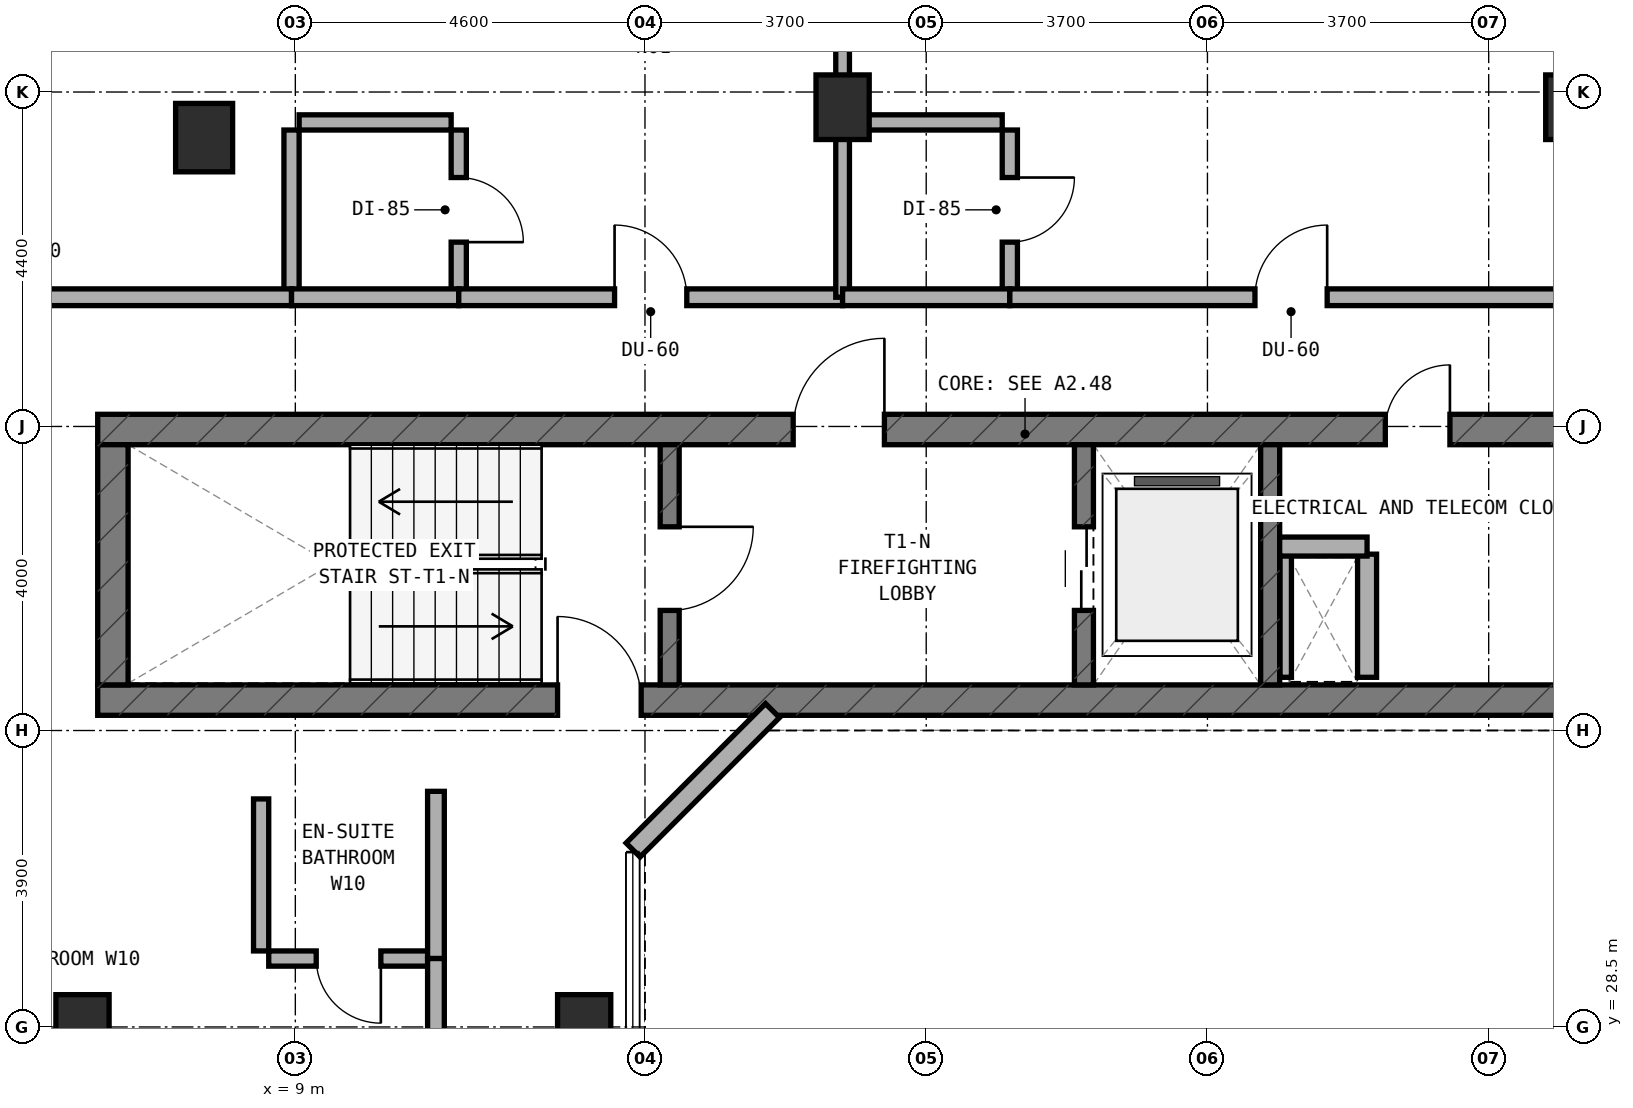
"""IFC4 building model, lengths in metres.
Left out: names, types, materials, properties, quantities, classifications, styles, units other than length and angle.
Written with IfcOpenShell. Run it as: python <this file> out.ifc"""

import sys

from ifc_helpers import new_model, si_unit, direction, frame, frame_2d, origin, origin_2d, place, context, subcontext, project, spatial, rectangle, extrude, element, fill, save


model = new_model("IFC4")
c1 = context("Model", 3, precision=1e-05, world=origin(), true_north=direction((0.0, 1.0)))
c2 = subcontext(c1, "Body", "Model", "MODEL_VIEW")
j1 = project(units=[si_unit("LENGTHUNIT", "METRE"), si_unit("PLANEANGLEUNIT", "RADIAN")], contexts=[c1])
p1 = place(None, origin())
s1 = spatial("IfcSite", under=j1, at=p1, CompositionType="ELEMENT")
p2 = place(p1, origin())
s2 = spatial("IfcBuilding", under=s1, at=p2, CompositionType="ELEMENT")
p3 = place(p2, frame((0.0, 0.0, 224.3)))
s3 = spatial("IfcBuildingStorey", under=s2, at=p3, CompositionType="ELEMENT", Elevation=224.3)
p4 = place(p3, frame((6.4, 32.8, 0.0), z_axis=(0.0, 0.0, 1.0), x_axis=(1.0, 0.0, 0.0)))
e1 = element("IfcWall", 1, at=p4, inside=s3, PredefinedType="SHEAR", context=c2, shape_type="SweptSolid", body=[
    extrude(rectangle(XDim=24.4, YDim=0.4, at=frame_2d((12.2, 0.0))), origin(), (0.0, 0.0, 1.0), 3.6),
])
p5 = place(p4, frame((6.05, 0.0, 0.0)))
e2 = element("IfcOpeningElement", 2, at=p5, cuts=e1, PredefinedType="OPENING", context=c2, shape_type="SweptSolid", body=[
    extrude(rectangle(XDim=1.1, YDim=2.15, at=frame_2d((0.55, 1.075))), frame((0.0, 0.21, 0.0), z_axis=(0.0, -1.0, 0.0), x_axis=(1.0, 0.0, 0.0)), (0.0, 0.0, 1.0), 0.42),
])
p6 = place(p3, frame((6.4, 36.36, 0.0), z_axis=(0.0, 0.0, 1.0), x_axis=(1.0, 0.0, 0.0)))
e3 = element("IfcWall", 3, at=p6, inside=s3, PredefinedType="SHEAR", context=c2, shape_type="SweptSolid", body=[
    extrude(rectangle(XDim=24.4, YDim=0.4, at=frame_2d((12.2, 0.0))), origin(), (0.0, 0.0, 1.0), 3.6),
])
p7 = place(p6, frame((9.15, 0.0, 0.0)))
e4 = element("IfcOpeningElement", 4, at=p7, cuts=e3, PredefinedType="OPENING", context=c2, shape_type="SweptSolid", body=[
    extrude(rectangle(XDim=1.2, YDim=2.15, at=frame_2d((0.6, 1.075))), frame((0.0, 0.21, 0.0), z_axis=(0.0, -1.0, 0.0), x_axis=(1.0, 0.0, 0.0)), (0.0, 0.0, 1.0), 0.42),
])
p8 = place(p6, frame((19.2, 0.0, 0.0)))
e5 = element("IfcOpeningElement", 5, at=p8, cuts=e3, PredefinedType="OPENING", context=c2, shape_type="SweptSolid", body=[
    extrude(rectangle(XDim=0.85, YDim=2.1, at=frame_2d((0.425, 1.05))), frame((0.0, 0.21, 0.0), z_axis=(0.0, -1.0, 0.0), x_axis=(1.0, 0.0, 0.0)), (0.0, 0.0, 1.0), 0.42),
])
p9 = place(p6, frame((16.94, 0.0, 0.0)))
e6 = element("IfcOpeningElement", 6, at=p9, cuts=e3, PredefinedType="OPENING", context=c2, shape_type="SweptSolid", body=[
    extrude(rectangle(XDim=0.85, YDim=2.1, at=frame_2d((0.425, 1.05))), frame((0.0, 0.21, 0.0), z_axis=(0.0, -1.0, 0.0), x_axis=(1.0, 0.0, 0.0)), (0.0, 0.0, 1.0), 0.42),
])
p10 = place(p3, frame((6.6, 33.0, 0.0), z_axis=(0.0, 0.0, 1.0), x_axis=(0.0, 1.0, 0.0)))
e7 = element("IfcWall", 7, at=p10, inside=s3, PredefinedType="SHEAR", context=c2, shape_type="SweptSolid", body=[
    extrude(rectangle(XDim=3.16, YDim=0.4, at=frame_2d((1.58, 0.0))), origin(), (0.0, 0.0, 1.0), 3.6),
])
p11 = place(p3, frame((13.925, 33.0, 0.0), z_axis=(0.0, 0.0, 1.0), x_axis=(0.0, 1.0, 0.0)))
e8 = element("IfcWall", 8, at=p11, inside=s3, PredefinedType="STANDARD", context=c2, shape_type="SweptSolid", body=[
    extrude(rectangle(XDim=3.16, YDim=0.25, at=frame_2d((1.58, 0.0))), origin(), (0.0, 0.0, 1.0), 3.32),
])
p12 = place(p11, frame((0.98, 0.0, 0.0)))
e9 = element("IfcOpeningElement", 9, at=p12, cuts=e8, PredefinedType="OPENING", context=c2, shape_type="SweptSolid", body=[
    extrude(rectangle(XDim=1.1, YDim=2.15, at=frame_2d((0.55, 1.075))), frame((0.0, 0.135, 0.0), z_axis=(0.0, -1.0, 0.0), x_axis=(1.0, 0.0, 0.0)), (0.0, 0.0, 1.0), 0.27),
])
p13 = place(p3, frame((19.375, 33.0, 0.0), z_axis=(0.0, 0.0, 1.0), x_axis=(0.0, 1.0, 0.0)))
e10 = element("IfcWall", 10, at=p13, inside=s3, PredefinedType="STANDARD", context=c2, shape_type="SweptSolid", body=[
    extrude(rectangle(XDim=3.16, YDim=0.25, at=frame_2d((1.58, 0.0))), origin(), (0.0, 0.0, 1.0), 3.32),
])
p14 = place(p13, frame((0.98, 0.0, 0.0)))
e11 = element("IfcOpeningElement", 11, at=p14, cuts=e10, PredefinedType="OPENING", context=c2, shape_type="SweptSolid", body=[
    extrude(rectangle(XDim=1.1, YDim=2.15, at=frame_2d((0.55, 1.075))), frame((0.0, 0.135, 0.0), z_axis=(0.0, -1.0, 0.0), x_axis=(1.0, 0.0, 0.0)), (0.0, 0.0, 1.0), 0.27),
])
p15 = place(p3, frame((21.825, 33.0, 0.0), z_axis=(0.0, 0.0, 1.0), x_axis=(0.0, 1.0, 0.0)))
e12 = element("IfcWall", 12, at=p15, inside=s3, PredefinedType="STANDARD", context=c2, shape_type="SweptSolid", body=[
    extrude(rectangle(XDim=3.16, YDim=0.25, at=frame_2d((1.58, 0.0))), origin(), (0.0, 0.0, 1.0), 3.32),
])
for number, where, z_axis, x_axis in (
    (13, (16.2, 40.6, 0.0), (0.0, 0.0, 1.0), (1.0, 0.0, 0.0)),
    (14, (25.8, 40.6, 0.0), (0.0, 0.0, 1.0), (1.0, 0.0, 0.0)),
    (15, (6.2, 28.5, 0.0), (0.0, 0.0, 1.0), (1.0, 0.0, 0.0)),
):
    element("IfcColumn", number, at=place(p3, frame(where, z_axis=z_axis, x_axis=x_axis)), inside=s3, PredefinedType="COLUMN", context=c2, shape_type="SweptSolid", body=[
        extrude(rectangle(XDim=0.7, YDim=0.85, at=origin_2d()), origin(), (0.0, 0.0, 1.0), 3.6),
    ])
p16 = place(p3, frame((7.8, 40.2, 0.0), z_axis=(0.0, 0.0, 1.0), x_axis=(1.0, 0.0, 0.0)))
e16 = element("IfcColumn", 16, at=p16, inside=s3, PredefinedType="COLUMN", context=c2, shape_type="SweptSolid", body=[
    extrude(rectangle(XDim=0.75, YDim=0.9, at=origin_2d()), origin(), (0.0, 0.0, 1.0), 3.6),
])
p17 = place(p3, frame((12.8, 28.5, 0.0), z_axis=(0.0, 0.0, 1.0), x_axis=(1.0, 0.0, 0.0)))
e17 = element("IfcColumn", 17, at=p17, inside=s3, PredefinedType="COLUMN", context=c2, shape_type="SweptSolid", body=[
    extrude(rectangle(XDim=0.7, YDim=0.85, at=origin_2d()), origin(), (0.0, 0.0, 1.0), 3.6),
])
p18 = place(p3, frame((15.278, 32.662, 0.0), z_axis=(0.0, 0.0, 1.0), x_axis=(-0.707059717605, -0.707153841636, 0.0)))
e18 = element("IfcWall", 18, at=p18, inside=s3, PredefinedType="STANDARD", context=c2, shape_type="SweptSolid", body=[
    extrude(rectangle(XDim=2.594, YDim=0.26, at=frame_2d((1.297, 0.0))), origin(), (0.0, 0.0, 1.0), 3.32),
])
p19 = place(p3, frame((22.03, 33.1, 0.0), z_axis=(0.0, 0.0, 1.0), x_axis=(0.0, 1.0, 0.0)))
e19 = element("IfcWall", 19, at=p19, inside=s3, PredefinedType="PARTITIONING", context=c2, shape_type="SweptSolid", body=[
    extrude(rectangle(XDim=1.62, YDim=0.15, at=frame_2d((0.81, 0.0))), origin(), (0.0, 0.0, 1.0), 3.32),
])
p20 = place(p3, frame((23.1, 33.1, 0.0), z_axis=(0.0, 0.0, 1.0), x_axis=(0.0, 1.0, 0.0)))
e20 = element("IfcWall", 20, at=p20, inside=s3, PredefinedType="SOLIDWALL", context=c2, shape_type="SweptSolid", body=[
    extrude(rectangle(XDim=1.62, YDim=0.25, at=frame_2d((0.81, 0.0))), origin(), (0.0, 0.0, 1.0), 3.32),
])
p21 = place(p3, frame((21.95, 34.82, 0.0), z_axis=(0.0, 0.0, 1.0), x_axis=(1.0, 0.0, 0.0)))
e21 = element("IfcWall", 21, at=p21, inside=s3, PredefinedType="SOLIDWALL", context=c2, shape_type="SweptSolid", body=[
    extrude(rectangle(XDim=1.15, YDim=0.25, at=frame_2d((0.575, 0.0))), origin(), (0.0, 0.0, 1.0), 3.32),
])
p22 = place(p3, frame((11.15, 38.2, 0.0), z_axis=(0.0, 0.0, 1.0), x_axis=(0.0, 1.0, 0.0)))
e22 = element("IfcWall", 22, at=p22, inside=s3, PredefinedType="PLUMBINGWALL", context=c2, shape_type="SweptSolid", body=[
    extrude(rectangle(XDim=2.1, YDim=0.2, at=frame_2d((1.05, 0.0))), origin(), (0.0, 0.0, 1.0), 3.015),
])
p23 = place(p22, frame((0.625, 0.0, 0.0)))
e23 = element("IfcOpeningElement", 23, at=p23, cuts=e22, PredefinedType="OPENING", context=c2, shape_type="SweptSolid", body=[
    extrude(rectangle(XDim=0.85, YDim=2.1, at=frame_2d((0.425, 1.05))), frame((0.0, 0.11, 0.0), z_axis=(0.0, -1.0, 0.0), x_axis=(1.0, 0.0, 0.0)), (0.0, 0.0, 1.0), 0.22),
])
p24 = place(p3, frame((9.05, 40.4, 0.0), z_axis=(0.0, 0.0, 1.0), x_axis=(1.0, 0.0, 0.0)))
e24 = element("IfcWall", 24, at=p24, inside=s3, PredefinedType="PLUMBINGWALL", context=c2, shape_type="SweptSolid", body=[
    extrude(rectangle(XDim=2.0, YDim=0.2, at=frame_2d((1.0, 0.0))), origin(), (0.0, 0.0, 1.0), 3.015),
])
p25 = place(p3, frame((8.95, 38.2, 0.0), z_axis=(0.0, 0.0, 1.0), x_axis=(0.0, 1.0, 0.0)))
e25 = element("IfcWall", 25, at=p25, inside=s3, PredefinedType="PLUMBINGWALL", context=c2, shape_type="SweptSolid", body=[
    extrude(rectangle(XDim=2.1, YDim=0.2, at=frame_2d((1.05, 0.0))), origin(), (0.0, 0.0, 1.0), 3.015),
])
p26 = place(p3, frame((1.96, 38.1, 0.0), z_axis=(0.0, 0.0, 1.0), x_axis=(1.0, 0.0, 0.0)))
e26 = element("IfcWall", 26, at=p26, inside=s3, PredefinedType="SOLIDWALL", context=c2, shape_type="SweptSolid", body=[
    extrude(rectangle(XDim=6.99, YDim=0.22, at=frame_2d((3.495, 0.0))), origin(), (0.0, 0.0, 1.0), 2.695),
])
p27 = place(p3, frame((8.95, 38.1, 0.0), z_axis=(0.0, 0.0, 1.0), x_axis=(1.0, 0.0, 0.0)))
e27 = element("IfcWall", 27, at=p27, inside=s3, PredefinedType="SOLIDWALL", context=c2, shape_type="SweptSolid", body=[
    extrude(rectangle(XDim=2.2, YDim=0.22, at=frame_2d((1.1, 0.0))), origin(), (0.0, 0.0, 1.0), 3.32),
])
p28 = place(p3, frame((11.15, 38.1, 0.0), z_axis=(0.0, 0.0, 1.0), x_axis=(1.0, 0.0, 0.0)))
e28 = element("IfcWall", 28, at=p28, inside=s3, PredefinedType="SOLIDWALL", context=c2, shape_type="SweptSolid", body=[
    extrude(rectangle(XDim=5.05, YDim=0.22, at=frame_2d((2.525, 0.0))), origin(), (0.0, 0.0, 1.0), 2.695),
])
p29 = place(p28, frame((2.05, 0.0, 0.0)))
e29 = element("IfcOpeningElement", 29, at=p29, cuts=e28, PredefinedType="OPENING", context=c2, shape_type="SweptSolid", body=[
    extrude(rectangle(XDim=0.95, YDim=2.1, at=frame_2d((0.475, 1.05))), frame((0.0, 0.12, 0.0), z_axis=(0.0, -1.0, 0.0), x_axis=(1.0, 0.0, 0.0)), (0.0, 0.0, 1.0), 0.24),
])
p30 = place(p3, frame((16.2, 38.1, 0.0), z_axis=(0.0, 0.0, 1.0), x_axis=(0.0, 1.0, 0.0)))
e30 = element("IfcWall", 30, at=p30, inside=s3, PredefinedType="SOLIDWALL", context=c2, shape_type="SweptSolid", body=[
    extrude(rectangle(XDim=6.04, YDim=0.18, at=frame_2d((3.02, 0.0))), origin(), (0.0, 0.0, 1.0), 2.695),
])
p31 = place(p3, frame((18.4, 38.2, 0.0), z_axis=(0.0, 0.0, 1.0), x_axis=(0.0, 1.0, 0.0)))
e31 = element("IfcWall", 31, at=p31, inside=s3, PredefinedType="PLUMBINGWALL", context=c2, shape_type="SweptSolid", body=[
    extrude(rectangle(XDim=2.1, YDim=0.2, at=frame_2d((1.05, 0.0))), origin(), (0.0, 0.0, 1.0), 3.055),
])
p32 = place(p31, frame((0.625, 0.0, 0.0)))
e32 = element("IfcOpeningElement", 32, at=p32, cuts=e31, PredefinedType="OPENING", context=c2, shape_type="SweptSolid", body=[
    extrude(rectangle(XDim=0.85, YDim=2.1, at=frame_2d((0.425, 1.05))), frame((0.0, 0.11, 0.0), z_axis=(0.0, -1.0, 0.0), x_axis=(1.0, 0.0, 0.0)), (0.0, 0.0, 1.0), 0.22),
])
p33 = place(p3, frame((16.3, 40.4, 0.0), z_axis=(0.0, 0.0, 1.0), x_axis=(1.0, 0.0, 0.0)))
e33 = element("IfcWall", 33, at=p33, inside=s3, PredefinedType="PLUMBINGWALL", context=c2, shape_type="SweptSolid", body=[
    extrude(rectangle(XDim=2.0, YDim=0.2, at=frame_2d((1.0, 0.0))), origin(), (0.0, 0.0, 1.0), 3.015),
])
p34 = place(p3, frame((16.2, 38.1, 0.0), z_axis=(0.0, 0.0, 1.0), x_axis=(1.0, 0.0, 0.0)))
e34 = element("IfcWall", 34, at=p34, inside=s3, PredefinedType="SOLIDWALL", context=c2, shape_type="SweptSolid", body=[
    extrude(rectangle(XDim=2.2, YDim=0.22, at=frame_2d((1.1, 0.0))), origin(), (0.0, 0.0, 1.0), 2.695),
])
p35 = place(p3, frame((18.4, 38.1, 0.0), z_axis=(0.0, 0.0, 1.0), x_axis=(1.0, 0.0, 0.0)))
e35 = element("IfcWall", 35, at=p35, inside=s3, PredefinedType="SOLIDWALL", context=c2, shape_type="SweptSolid", body=[
    extrude(rectangle(XDim=7.4, YDim=0.22, at=frame_2d((3.7, 0.0))), origin(), (0.0, 0.0, 1.0), 2.695),
])
p36 = place(p35, frame((3.225, 0.0, 0.0)))
e36 = element("IfcOpeningElement", 36, at=p36, cuts=e35, PredefinedType="OPENING", context=c2, shape_type="SweptSolid", body=[
    extrude(rectangle(XDim=0.95, YDim=2.1, at=frame_2d((0.475, 1.05))), frame((0.0, 0.12, 0.0), z_axis=(0.0, -1.0, 0.0), x_axis=(1.0, 0.0, 0.0)), (0.0, 0.0, 1.0), 0.24),
])
p37 = place(p3, frame((8.65, 29.4, 0.0), z_axis=(0.0, 0.0, 1.0), x_axis=(1.0, 0.0, 0.0)))
e37 = element("IfcWall", 37, at=p37, inside=s3, PredefinedType="PLUMBINGWALL", context=c2, shape_type="SweptSolid", body=[
    extrude(rectangle(XDim=2.1, YDim=0.2, at=frame_2d((1.05, 0.0))), origin(), (0.0, 0.0, 1.0), 3.32),
])
p38 = place(p37, frame((0.625, 0.0, 0.0)))
e38 = element("IfcOpeningElement", 38, at=p38, cuts=e37, PredefinedType="OPENING", context=c2, shape_type="SweptSolid", body=[
    extrude(rectangle(XDim=0.85, YDim=2.1, at=frame_2d((0.425, 1.05))), frame((0.0, 0.11, 0.0), z_axis=(0.0, -1.0, 0.0), x_axis=(1.0, 0.0, 0.0)), (0.0, 0.0, 1.0), 0.22),
])
p39 = place(p3, frame((8.55, 29.5, 0.0), z_axis=(0.0, 0.0, 1.0), x_axis=(0.0, 1.0, 0.0)))
e39 = element("IfcWall", 39, at=p39, inside=s3, PredefinedType="PLUMBINGWALL", context=c2, shape_type="SweptSolid", body=[
    extrude(rectangle(XDim=2.0, YDim=0.2, at=frame_2d((1.0, 0.0))), origin(), (0.0, 0.0, 1.0), 3.32),
])
p40 = place(p3, frame((10.85, 29.4, 0.0), z_axis=(0.0, 0.0, 1.0), x_axis=(0.0, 1.0, 0.0)))
e40 = element("IfcWall", 40, at=p40, inside=s3, PredefinedType="SOLIDWALL", context=c2, shape_type="SweptSolid", body=[
    extrude(rectangle(XDim=2.2, YDim=0.22, at=frame_2d((1.1, 0.0))), origin(), (0.0, 0.0, 1.0), 3.32),
])
p41 = place(p3, frame((10.85, 25.77, 0.0), z_axis=(0.0, 0.0, 1.0), x_axis=(0.0, 1.0, 0.0)))
e41 = element("IfcWall", 41, at=p41, inside=s3, PredefinedType="SOLIDWALL", context=c2, shape_type="SweptSolid", body=[
    extrude(rectangle(XDim=3.63, YDim=0.22, at=frame_2d((1.815, 0.0))), origin(), (0.0, 0.0, 1.0), 2.695),
])
p42 = place(p41, frame((1.34, 0.0, 0.0)))
e42 = element("IfcOpeningElement", 42, at=p42, cuts=e41, PredefinedType="OPENING", context=c2, shape_type="SweptSolid", body=[
    extrude(rectangle(XDim=0.95, YDim=2.1, at=frame_2d((0.475, 1.05))), frame((0.0, 0.12, 0.0), z_axis=(0.0, -1.0, 0.0), x_axis=(1.0, 0.0, 0.0)), (0.0, 0.0, 1.0), 0.24),
])
p43 = place(p12, frame((1.1, 0.0, 0.0), z_axis=(0.0, 0.0, 1.0), x_axis=(-1.0, 0.0, 0.0)))
e43 = element("IfcDoor", 43, at=p43, inside=s3, OperationType="SINGLE_SWING_LEFT", PredefinedType="DOOR", context=c2, shape_type="SweptSolid", body=[
    extrude(rectangle(XDim=1.1, YDim=2.15, at=frame_2d((0.55, 1.075))), frame((0.0, 0.025, 0.0), z_axis=(0.0, -1.0, 0.0), x_axis=(1.0, 0.0, 0.0)), (0.0, 0.0, 1.0), 0.05),
])
fill(e9, e43)
p44 = place(p7, origin())
e44 = element("IfcDoor", 44, at=p44, inside=s3, OperationType="SINGLE_SWING_RIGHT", PredefinedType="DOOR", context=c2, shape_type="SweptSolid", body=[
    extrude(rectangle(XDim=1.2, YDim=2.15, at=frame_2d((0.6, 1.075))), frame((0.0, 0.025, 0.0), z_axis=(0.0, -1.0, 0.0), x_axis=(1.0, 0.0, 0.0)), (0.0, 0.0, 1.0), 0.05),
])
fill(e4, e44)
p45 = place(p14, origin())
e45 = element("IfcDoor", 45, at=p45, inside=s3, OperationType="DOUBLE_DOOR_SLIDING", PredefinedType="DOOR", context=c2, shape_type="SweptSolid", body=[
    extrude(rectangle(XDim=1.1, YDim=2.15, at=frame_2d((0.55, 1.075))), frame((0.0, 0.025, 0.0), z_axis=(0.0, -1.0, 0.0), x_axis=(1.0, 0.0, 0.0)), (0.0, 0.0, 1.0), 0.05),
])
fill(e11, e45)
p46 = place(p9, origin())
e46 = element("IfcDoor", 46, at=p46, inside=s3, OperationType="SINGLE_SWING_RIGHT", PredefinedType="DOOR", context=c2, shape_type="SweptSolid", body=[
    extrude(rectangle(XDim=0.85, YDim=2.1, at=frame_2d((0.425, 1.05))), frame((0.0, 0.025, 0.0), z_axis=(0.0, -1.0, 0.0), x_axis=(1.0, 0.0, 0.0)), (0.0, 0.0, 1.0), 0.05),
])
fill(e6, e46)
p47 = place(p5, origin())
e47 = element("IfcDoor", 47, at=p47, inside=s3, OperationType="SINGLE_SWING_LEFT", PredefinedType="DOOR", context=c2, shape_type="SweptSolid", body=[
    extrude(rectangle(XDim=1.1, YDim=2.15, at=frame_2d((0.55, 1.075))), frame((0.0, 0.025, 0.0), z_axis=(0.0, -1.0, 0.0), x_axis=(1.0, 0.0, 0.0)), (0.0, 0.0, 1.0), 0.05),
])
fill(e2, e47)
p48 = place(p23, frame((0.85, 0.0, 0.0), z_axis=(0.0, 0.0, 1.0), x_axis=(-1.0, 0.0, 0.0)))
e48 = element("IfcDoor", 48, at=p48, inside=s3, OperationType="SINGLE_SWING_RIGHT", PredefinedType="DOOR", context=c2, shape_type="SweptSolid", body=[
    extrude(rectangle(XDim=0.85, YDim=2.1, at=frame_2d((0.425, 1.05))), frame((0.0, 0.025, 0.0), z_axis=(0.0, -1.0, 0.0), x_axis=(1.0, 0.0, 0.0)), (0.0, 0.0, 1.0), 0.05),
])
fill(e23, e48)
p49 = place(p29, origin())
e49 = element("IfcDoor", 49, at=p49, inside=s3, OperationType="SINGLE_SWING_LEFT", PredefinedType="DOOR", context=c2, shape_type="SweptSolid", body=[
    extrude(rectangle(XDim=0.95, YDim=2.1, at=frame_2d((0.475, 1.05))), frame((0.0, 0.025, 0.0), z_axis=(0.0, -1.0, 0.0), x_axis=(1.0, 0.0, 0.0)), (0.0, 0.0, 1.0), 0.05),
])
fill(e29, e49)
p50 = place(p32, frame((0.85, 0.0, 0.0), z_axis=(0.0, 0.0, 1.0), x_axis=(-1.0, 0.0, 0.0)))
e50 = element("IfcDoor", 50, at=p50, inside=s3, OperationType="SINGLE_SWING_LEFT", PredefinedType="DOOR", context=c2, shape_type="SweptSolid", body=[
    extrude(rectangle(XDim=0.85, YDim=2.1, at=frame_2d((0.425, 1.05))), frame((0.0, 0.025, 0.0), z_axis=(0.0, -1.0, 0.0), x_axis=(1.0, 0.0, 0.0)), (0.0, 0.0, 1.0), 0.05),
])
fill(e32, e50)
p51 = place(p36, origin())
e51 = element("IfcDoor", 51, at=p51, inside=s3, OperationType="SINGLE_SWING_RIGHT", PredefinedType="DOOR", context=c2, shape_type="SweptSolid", body=[
    extrude(rectangle(XDim=0.95, YDim=2.1, at=frame_2d((0.475, 1.05))), frame((0.0, 0.025, 0.0), z_axis=(0.0, -1.0, 0.0), x_axis=(1.0, 0.0, 0.0)), (0.0, 0.0, 1.0), 0.05),
])
fill(e36, e51)
p52 = place(p38, frame((0.85, 0.0, 0.0), z_axis=(0.0, 0.0, 1.0), x_axis=(-1.0, 0.0, 0.0)))
e52 = element("IfcDoor", 52, at=p52, inside=s3, OperationType="SINGLE_SWING_LEFT", PredefinedType="DOOR", context=c2, shape_type="SweptSolid", body=[
    extrude(rectangle(XDim=0.85, YDim=2.1, at=frame_2d((0.425, 1.05))), frame((0.0, 0.025, 0.0), z_axis=(0.0, -1.0, 0.0), x_axis=(1.0, 0.0, 0.0)), (0.0, 0.0, 1.0), 0.05),
])
fill(e38, e52)
save(model, sys.argv[1])
